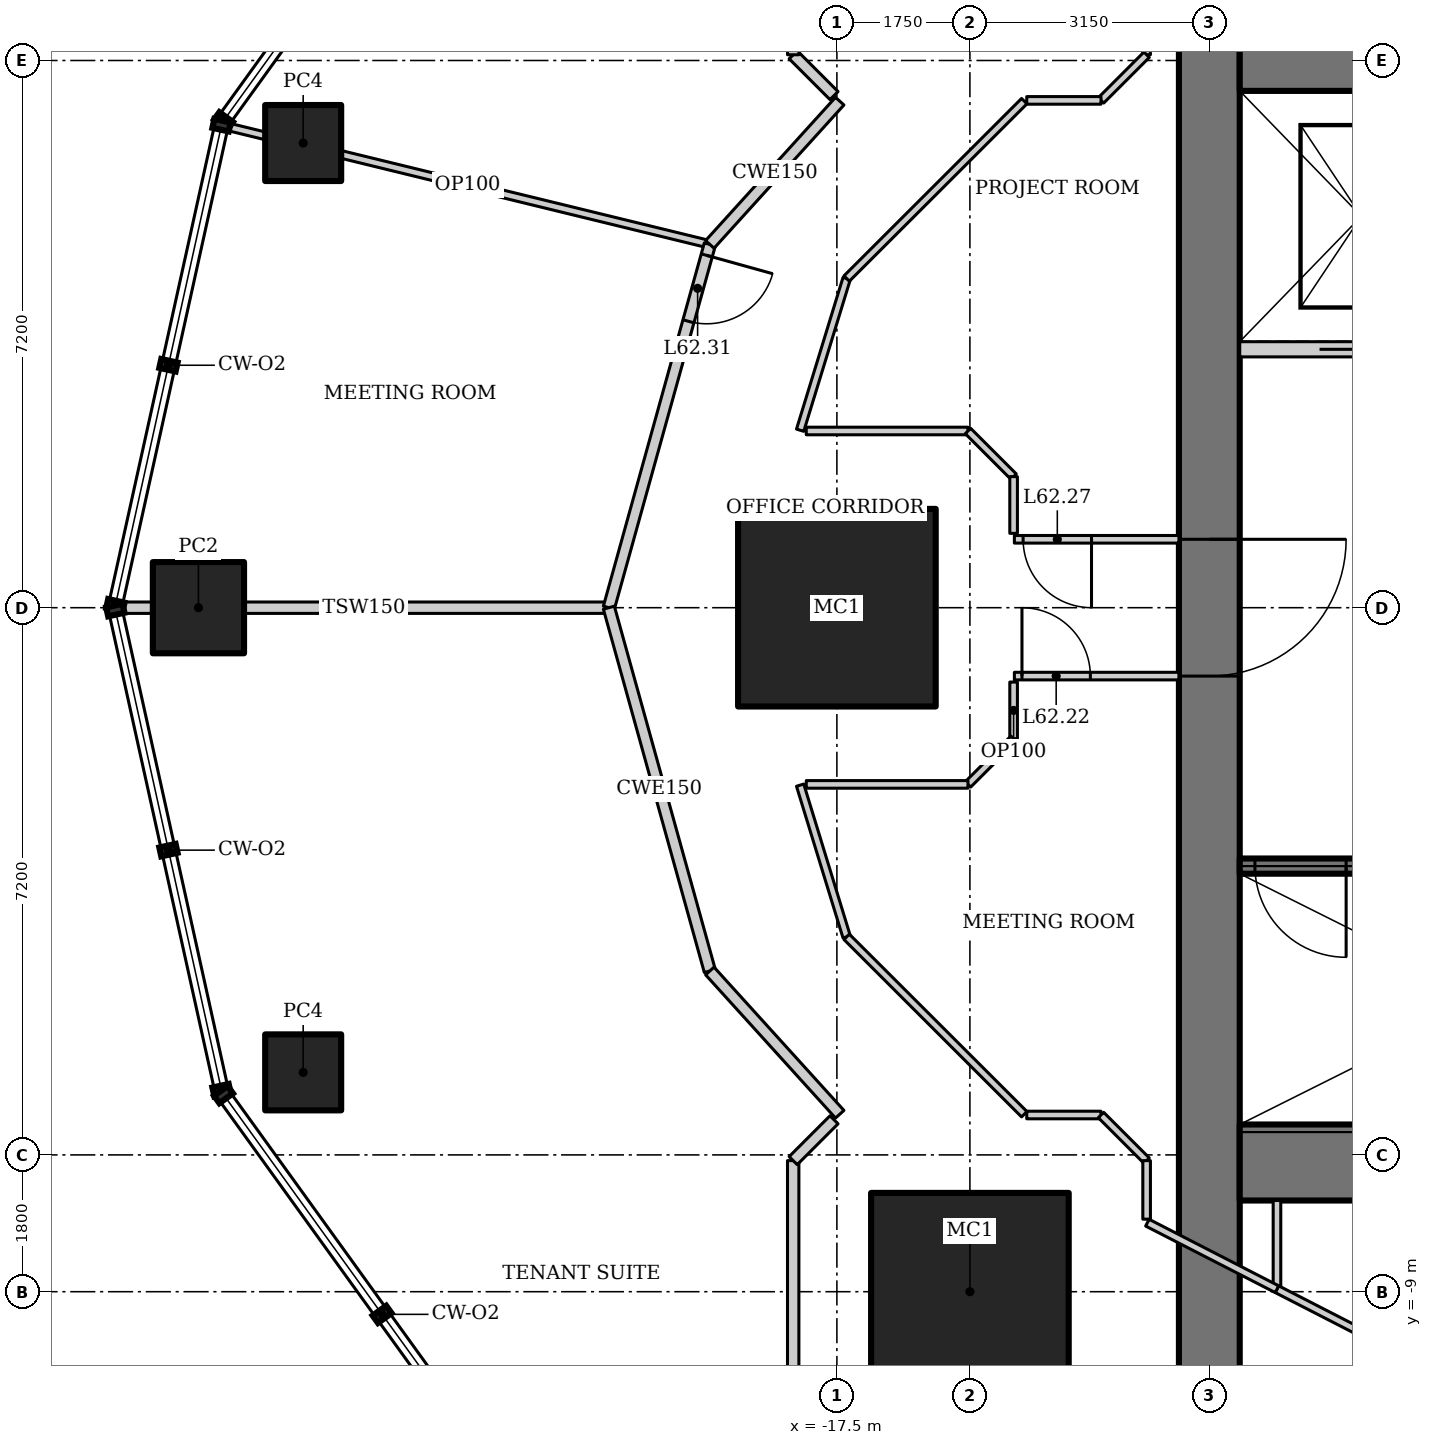
"""IFC4 building model, lengths in metres.
Left out: names, types, materials, properties, quantities, classifications, styles, units other than length and angle.
Written with IfcOpenShell. Run it as: python <this file> out.ifc"""

import sys

from ifc_helpers import new_model, si_unit, direction, frame, frame_2d, origin, origin_2d, place, context, subcontext, project, spatial, rectangle, hollow_rectangle, extrude, element, fill, save


model = new_model("IFC4")
c1 = context("Model", 3, precision=1e-05, world=origin(), true_north=direction((0.0, 1.0)))
c2 = subcontext(c1, "Body", "Model", "MODEL_VIEW")
j1 = project(units=[si_unit("LENGTHUNIT", "METRE"), si_unit("PLANEANGLEUNIT", "RADIAN")], contexts=[c1])
p1 = place(None, origin())
s1 = spatial("IfcSite", under=j1, at=p1, CompositionType="ELEMENT")
p2 = place(p1, origin())
s2 = spatial("IfcBuilding", under=s1, at=p2, CompositionType="ELEMENT")
p3 = place(p2, frame((0.0, 0.0, 266.2)))
s3 = spatial("IfcBuildingStorey", under=s2, at=p3, CompositionType="ELEMENT", Elevation=266.2)
for number, where, z_axis, x_axis in (
    (1, (-17.5, 0.0, 0.0), (0.0, 0.0, 1.0), (1.0, 0.0, 0.0)),
    (2, (-15.75, -9.0, 0.0), (0.0, 0.0, 1.0), (1.0, 0.0, 0.0)),
):
    element("IfcColumn", number, at=place(p3, frame(where, z_axis=z_axis, x_axis=x_axis)), inside=s3, PredefinedType="COLUMN", context=c2, shape_type="SweptSolid", body=[
        extrude(hollow_rectangle(XDim=2.6, YDim=2.6, WallThickness=0.13, at=origin_2d()), origin(), (0.0, 0.0, 1.0), 4.2),
    ])
p4 = place(p3, frame((-24.522, 6.114, 0.0), z_axis=(0.398362767155, -0.099325785847, 0.911834137336), x_axis=(0.241928299692, 0.970294129534, 0.0)))
e3 = element("IfcColumn", 3, at=p4, inside=s3, PredefinedType="COLUMN", context=c2, shape_type="SweptSolid", body=[
    extrude(hollow_rectangle(XDim=1.0, YDim=1.0, WallThickness=0.08, at=origin_2d()), origin(), (0.0, 0.0, 1.0), 4.378),
])
p5 = place(p3, frame((-25.9, 0.0, 0.0), z_axis=(0.429918375723, 0.0, 0.902867758986), x_axis=(0.0, 1.0, 0.0)))
e4 = element("IfcColumn", 4, at=p5, inside=s3, PredefinedType="COLUMN", context=c2, shape_type="SweptSolid", body=[
    extrude(hollow_rectangle(XDim=1.2, YDim=1.2, WallThickness=0.1, at=origin_2d()), origin(), (0.0, 0.0, 1.0), 4.363),
])
p6 = place(p3, frame((-24.522, -6.114, 0.0), z_axis=(0.398362767155, 0.099325785847, 0.911834137336), x_axis=(-0.241928299692, 0.970294129534, 0.0)))
e5 = element("IfcColumn", 5, at=p6, inside=s3, PredefinedType="COLUMN", context=c2, shape_type="SweptSolid", body=[
    extrude(hollow_rectangle(XDim=1.0, YDim=1.0, WallThickness=0.08, at=origin_2d()), origin(), (0.0, 0.0, 1.0), 4.378),
])
p7 = place(p3, frame((-12.6, 11.0, 0.0), z_axis=(0.0, 0.0, 1.0), x_axis=(0.0, -1.0, 0.0)))
e6 = element("IfcWall", 6, at=p7, inside=s3, PredefinedType="SHEAR", context=c2, shape_type="SweptSolid", body=[
    extrude(rectangle(XDim=22.0, YDim=0.8, at=frame_2d((11.0, 0.0))), origin(), (0.0, 0.0, 1.0), 4.2),
])
p8 = place(p7, frame((10.1, 0.0, 0.0)))
e7 = element("IfcOpeningElement", 7, at=p8, cuts=e6, PredefinedType="OPENING", context=c2, shape_type="SweptSolid", body=[
    extrude(rectangle(XDim=1.8, YDim=2.1, at=frame_2d((0.9, 1.05))), frame((0.0, 0.41, 0.0), z_axis=(0.0, -1.0, 0.0), x_axis=(1.0, 0.0, 0.0)), (0.0, 0.0, 1.0), 0.82),
])
p9 = place(p3, frame((-12.2, -7.3, 0.0), z_axis=(0.0, 0.0, 1.0), x_axis=(1.0, 0.0, 0.0)))
e8 = element("IfcWall", 8, at=p9, inside=s3, PredefinedType="SHEAR", context=c2, shape_type="SweptSolid", body=[
    extrude(rectangle(XDim=24.4, YDim=1.0, at=frame_2d((12.2, 0.0))), origin(), (0.0, 0.0, 1.0), 4.2),
])
p10 = place(p3, frame((-5.6, 7.3, 0.0), z_axis=(0.0, 0.0, 1.0), x_axis=(-1.0, 0.0, 0.0)))
e9 = element("IfcWall", 9, at=p10, inside=s3, PredefinedType="SHEAR", context=c2, shape_type="SweptSolid", body=[
    extrude(rectangle(XDim=6.6, YDim=1.0, at=frame_2d((3.3, 0.0))), origin(), (0.0, 0.0, 1.0), 4.2),
])
p11 = place(p3, frame((-5.6, -3.4, 0.0), z_axis=(0.0, 0.0, 1.0), x_axis=(-1.0, 0.0, 0.0)))
e10 = element("IfcWall", 10, at=p11, inside=s3, PredefinedType="SHEAR", context=c2, shape_type="SweptSolid", body=[
    extrude(rectangle(XDim=6.6, YDim=0.2, at=frame_2d((3.3, 0.0))), origin(), (0.0, 0.0, 1.0), 4.2),
])
p12 = place(p11, frame((5.2, 0.0, 0.0)))
e11 = element("IfcOpeningElement", 11, at=p12, cuts=e10, PredefinedType="OPENING", context=c2, shape_type="SweptSolid", body=[
    extrude(rectangle(XDim=1.2, YDim=2.1, at=frame_2d((0.6, 1.05))), frame((0.0, 0.11, 0.0), z_axis=(0.0, -1.0, 0.0), x_axis=(1.0, 0.0, 0.0)), (0.0, 0.0, 1.0), 0.22),
])
p13 = place(p3, frame((-12.2, 3.4, 0.0), z_axis=(0.0, 0.0, 1.0), x_axis=(1.0, 0.0, 0.0)))
e12 = element("IfcWall", 12, at=p13, inside=s3, PredefinedType="SOLIDWALL", context=c2, shape_type="SweptSolid", body=[
    extrude(rectangle(XDim=6.6, YDim=0.2, at=frame_2d((3.3, 0.0))), origin(), (0.0, 0.0, 1.0), 4.2),
])
p14 = place(p13, frame((1.05, 0.0, 0.0)))
e13 = element("IfcOpeningElement", 13, at=p14, cuts=e12, PredefinedType="OPENING", context=c2, shape_type="SweptSolid", body=[
    extrude(rectangle(XDim=1.1, YDim=2.2, at=frame_2d((0.55, 1.1))), frame((0.0, 0.11, 0.0), z_axis=(0.0, -1.0, 0.0), x_axis=(1.0, 0.0, 0.0)), (0.0, 0.0, 1.0), 0.22),
])
p15 = place(p13, frame((4.3, 0.0, 0.0)))
e14 = element("IfcOpeningElement", 14, at=p15, cuts=e12, PredefinedType="OPENING", context=c2, shape_type="SweptSolid", body=[
    extrude(rectangle(XDim=1.4, YDim=2.2, at=frame_2d((0.7, 1.1))), frame((0.0, 0.11, 0.0), z_axis=(0.0, -1.0, 0.0), x_axis=(1.0, 0.0, 0.0)), (0.0, 0.0, 1.0), 0.22),
])
p16 = place(p3, frame((-25.543, 6.335, 0.0), z_axis=(0.0, 0.0, 1.0), x_axis=(0.971467850621, -0.237171278215, 0.0)))
e15 = element("IfcWall", 15, at=p16, inside=s3, PredefinedType="PARTITIONING", context=c2, shape_type="SweptSolid", body=[
    extrude(rectangle(XDim=6.558, YDim=0.1, at=frame_2d((3.279, 0.0))), origin(), (0.0, 0.0, 1.0), 3.128),
])
p17 = place(p3, frame((-26.944, 0.0, 0.0), z_axis=(0.0, 0.0, 1.0), x_axis=(1.0, 0.0, 0.0)))
e16 = element("IfcWall", 16, at=p17, inside=s3, PredefinedType="PARTITIONING", context=c2, shape_type="SweptSolid", body=[
    extrude(rectangle(XDim=6.444, YDim=0.15, at=frame_2d((3.222, 0.0))), origin(), (0.0, 0.0, 1.0), 3.438),
])
p18 = place(p3, frame((-19.172, 4.78, 0.0), z_axis=(0.0, 0.0, 1.0), x_axis=(-0.26770731566, -0.963500281859, 0.0)))
e17 = element("IfcWall", 17, at=p18, inside=s3, PredefinedType="PARTITIONING", context=c2, shape_type="SweptSolid", body=[
    extrude(rectangle(XDim=4.961, YDim=0.15, at=frame_2d((2.48, 0.0))), origin(), (0.0, 0.0, 1.0), 4.05),
])
p19 = place(p18, frame((0.15, 0.0, 0.0)))
e18 = element("IfcOpeningElement", 18, at=p19, cuts=e17, PredefinedType="OPENING", context=c2, shape_type="SweptSolid", body=[
    extrude(rectangle(XDim=0.9, YDim=2.1, at=frame_2d((0.45, 1.05))), frame((0.0, 0.085, 0.0), z_axis=(0.0, -1.0, 0.0), x_axis=(1.0, 0.0, 0.0)), (0.0, 0.0, 1.0), 0.17),
])
p20 = place(p3, frame((-20.5, 0.0, 0.0), z_axis=(0.0, 0.0, 1.0), x_axis=(0.26770731566, -0.963500281859, 0.0)))
e19 = element("IfcWall", 19, at=p20, inside=s3, PredefinedType="PARTITIONING", context=c2, shape_type="SweptSolid", body=[
    extrude(rectangle(XDim=4.961, YDim=0.15, at=frame_2d((2.48, 0.0))), origin(), (0.0, 0.0, 1.0), 4.05),
])
p21 = place(p3, frame((-11.71, -7.8, 0.0), z_axis=(0.0, 0.0, 1.0), x_axis=(0.0, -1.0, 0.0)))
e20 = element("IfcWall", 20, at=p21, inside=s3, PredefinedType="PARTITIONING", context=c2, shape_type="SweptSolid", body=[
    extrude(rectangle(XDim=1.167, YDim=0.1, at=frame_2d((0.583, 0.0))), origin(), (0.0, 0.0, 1.0), 4.05),
])
p22 = place(p3, frame((-9.67, -10.014, 0.0), z_axis=(0.0, 0.0, 1.0), x_axis=(-0.889605609385, 0.456729525814, 0.0)))
e21 = element("IfcWall", 21, at=p22, inside=s3, PredefinedType="PARTITIONING", context=c2, shape_type="SweptSolid", body=[
    extrude(rectangle(XDim=2.293, YDim=0.1, at=frame_2d((1.146, 0.0))), origin(), (0.0, 0.0, 1.0), 4.05),
])
p23 = place(p3, frame((-17.372, -4.331, 0.0), z_axis=(0.0, 0.0, 1.0), x_axis=(-0.293231279211, 0.956041535129, 0.0)))
e22 = element("IfcWall", 22, at=p23, inside=s3, PredefinedType="PARTITIONING", context=c2, shape_type="SweptSolid", body=[
    extrude(rectangle(XDim=2.088, YDim=0.1, at=frame_2d((1.044, 0.0))), origin(), (0.0, 0.0, 1.0), 4.05),
])
p24 = place(p3, frame((-15.165, -0.9, 0.0), z_axis=(0.0, 0.0, 1.0), x_axis=(1.0, 0.0, 0.0)))
e23 = element("IfcWall", 23, at=p24, inside=s3, PredefinedType="PARTITIONING", context=c2, shape_type="SweptSolid", body=[
    extrude(rectangle(XDim=2.165, YDim=0.1, at=frame_2d((1.083, 0.0))), origin(), (0.0, 0.0, 1.0), 4.05),
])
p25 = place(p24, frame((0.1, 0.0, 0.0)))
e24 = element("IfcOpeningElement", 24, at=p25, cuts=e23, PredefinedType="OPENING", context=c2, shape_type="SweptSolid", body=[
    extrude(rectangle(XDim=0.9, YDim=2.1, at=frame_2d((0.45, 1.05))), frame((0.0, 0.06, 0.0), z_axis=(0.0, -1.0, 0.0), x_axis=(1.0, 0.0, 0.0)), (0.0, 0.0, 1.0), 0.12),
])
p26 = place(p3, frame((-13.0, 0.9, 0.0), z_axis=(0.0, 0.0, 1.0), x_axis=(-1.0, 0.0, 0.0)))
e25 = element("IfcWall", 25, at=p26, inside=s3, PredefinedType="PARTITIONING", context=c2, shape_type="SweptSolid", body=[
    extrude(rectangle(XDim=2.165, YDim=0.1, at=frame_2d((1.083, 0.0))), origin(), (0.0, 0.0, 1.0), 4.05),
])
p27 = place(p26, frame((1.15, 0.0, 0.0)))
e26 = element("IfcOpeningElement", 26, at=p27, cuts=e25, PredefinedType="OPENING", context=c2, shape_type="SweptSolid", body=[
    extrude(rectangle(XDim=0.9, YDim=2.1, at=frame_2d((0.45, 1.05))), frame((0.0, 0.06, 0.0), z_axis=(0.0, -1.0, 0.0), x_axis=(1.0, 0.0, 0.0)), (0.0, 0.0, 1.0), 0.12),
])
p28 = place(p3, frame((-17.984, 2.335, 0.0), z_axis=(0.0, 0.0, 1.0), x_axis=(0.293231279211, 0.956041535129, 0.0)))
e27 = element("IfcWall", 27, at=p28, inside=s3, PredefinedType="PARTITIONING", context=c2, shape_type="SweptSolid", body=[
    extrude(rectangle(XDim=2.088, YDim=0.1, at=frame_2d((1.044, 0.0))), origin(), (0.0, 0.0, 1.0), 4.05),
])
p29 = place(p3, frame((-15.175, -0.978, 0.0), z_axis=(0.0, 0.0, 1.0), x_axis=(0.0, -1.0, 0.0)))
e28 = element("IfcWall", 28, at=p29, inside=s3, PredefinedType="PARTITIONING", context=c2, shape_type="SweptSolid", body=[
    extrude(rectangle(XDim=0.746, YDim=0.1, at=frame_2d((0.373, 0.0))), origin(), (0.0, 0.0, 1.0), 4.05),
])
p30 = place(p3, frame((-15.175, -1.725, 0.0), z_axis=(0.0, 0.0, 1.0), x_axis=(-0.707106781187, -0.707106781187, 0.0)))
e29 = element("IfcWall", 29, at=p30, inside=s3, PredefinedType="PARTITIONING", context=c2, shape_type="SweptSolid", body=[
    extrude(rectangle(XDim=0.849, YDim=0.1, at=frame_2d((0.425, 0.0))), origin(), (0.0, 0.0, 1.0), 4.05),
])
for number, where, z_axis, x_axis in (
    (30, (-15.775, -2.325, 0.0), (0.0, 0.0, 1.0), (-1.0, 0.0, 0.0)),
    (31, (-17.903, 2.325, 0.0), (0.0, 0.0, 1.0), (1.0, 0.0, 0.0)),
):
    element("IfcWall", number, at=place(p3, frame(where, z_axis=z_axis, x_axis=x_axis)), inside=s3, PredefinedType="PARTITIONING", context=c2, shape_type="SweptSolid", body=[
        extrude(rectangle(XDim=2.128, YDim=0.1, at=frame_2d((1.064, 0.0))), origin(), (0.0, 0.0, 1.0), 4.05),
    ])
p31 = place(p3, frame((-15.775, 2.325, 0.0), z_axis=(0.0, 0.0, 1.0), x_axis=(0.707106781187, -0.707106781187, 0.0)))
e32 = element("IfcWall", 32, at=p31, inside=s3, PredefinedType="PARTITIONING", context=c2, shape_type="SweptSolid", body=[
    extrude(rectangle(XDim=0.849, YDim=0.1, at=frame_2d((0.425, 0.0))), origin(), (0.0, 0.0, 1.0), 4.05),
])
p32 = place(p3, frame((-15.175, 1.725, 0.0), z_axis=(0.0, 0.0, 1.0), x_axis=(0.0, -1.0, 0.0)))
e33 = element("IfcWall", 33, at=p32, inside=s3, PredefinedType="PARTITIONING", context=c2, shape_type="SweptSolid", body=[
    extrude(rectangle(XDim=0.746, YDim=0.1, at=frame_2d((0.373, 0.0))), origin(), (0.0, 0.0, 1.0), 4.05),
])
p33 = place(p3, frame((-19.172, -4.78, 0.0), z_axis=(0.0, 0.0, 1.0), x_axis=(0.671721890643, -0.74080341632, 0.0)))
e34 = element("IfcWall", 34, at=p33, inside=s3, PredefinedType="PARTITIONING", context=c2, shape_type="SweptSolid", body=[
    extrude(rectangle(XDim=2.544, YDim=0.15, at=frame_2d((1.272, 0.0))), origin(), (0.0, 0.0, 1.0), 4.05),
])
p34 = place(p3, frame((-11.71, -8.967, 0.0), z_axis=(0.0, 0.0, 1.0), x_axis=(-0.889638356137, 0.456665736935, 0.0)))
e35 = element("IfcWall", 35, at=p34, inside=s3, PredefinedType="PARTITIONING", context=c2, shape_type="SweptSolid", body=[
    extrude(rectangle(XDim=1.917, YDim=0.1, at=frame_2d((0.958, 0.0))), origin(), (0.0, 0.0, 1.0), 4.05),
])
p35 = place(p3, frame((-15.035, -6.665, 0.0), z_axis=(0.0, 0.0, 1.0), x_axis=(-0.707587114823, 0.70662612104, 0.0)))
e36 = element("IfcWall", 36, at=p35, inside=s3, PredefinedType="PARTITIONING", context=c2, shape_type="SweptSolid", body=[
    extrude(rectangle(XDim=3.303, YDim=0.1, at=frame_2d((1.651, 0.0))), origin(), (0.0, 0.0, 1.0), 4.05),
])
p36 = place(p3, frame((-15.002, -6.675, 0.0), z_axis=(0.0, 0.0, 1.0), x_axis=(1.0, 0.0, 0.0)))
e37 = element("IfcWall", 37, at=p36, inside=s3, PredefinedType="PARTITIONING", context=c2, shape_type="SweptSolid", body=[
    extrude(rectangle(XDim=0.977, YDim=0.1, at=frame_2d((0.488, 0.0))), origin(), (0.0, 0.0, 1.0), 4.05),
])
p37 = place(p3, frame((-14.025, -6.675, 0.0), z_axis=(0.0, 0.0, 1.0), x_axis=(0.707106781187, -0.707106781187, 0.0)))
e38 = element("IfcWall", 38, at=p37, inside=s3, PredefinedType="PARTITIONING", context=c2, shape_type="SweptSolid", body=[
    extrude(rectangle(XDim=0.849, YDim=0.1, at=frame_2d((0.425, 0.0))), origin(), (0.0, 0.0, 1.0), 4.05),
])
p38 = place(p3, frame((-13.425, -7.275, 0.0), z_axis=(0.0, 0.0, 1.0), x_axis=(0.0, -1.0, 0.0)))
e39 = element("IfcWall", 39, at=p38, inside=s3, PredefinedType="PARTITIONING", context=c2, shape_type="SweptSolid", body=[
    extrude(rectangle(XDim=0.77, YDim=0.1, at=frame_2d((0.385, 0.0))), origin(), (0.0, 0.0, 1.0), 4.05),
])
p39 = place(p3, frame((-18.075, -10.725, 0.0), z_axis=(0.0, 0.0, 1.0), x_axis=(0.0, 1.0, 0.0)))
e40 = element("IfcWall", 40, at=p39, inside=s3, PredefinedType="PARTITIONING", context=c2, shape_type="SweptSolid", body=[
    extrude(rectangle(XDim=3.449, YDim=0.15, at=frame_2d((1.725, 0.0))), origin(), (0.0, 0.0, 1.0), 3.522),
])
p40 = place(p3, frame((-18.075, -7.275, 0.0), z_axis=(0.0, 0.0, 1.0), x_axis=(0.707106781187, 0.707106781187, 0.0)))
e41 = element("IfcWall", 41, at=p40, inside=s3, PredefinedType="PARTITIONING", context=c2, shape_type="SweptSolid", body=[
    extrude(rectangle(XDim=0.76, YDim=0.15, at=frame_2d((0.38, 0.0))), origin(), (0.0, 0.0, 1.0), 4.05),
])
p41 = place(p3, frame((-17.463, 6.665, 0.0), z_axis=(0.0, 0.0, 1.0), x_axis=(-0.671721890643, -0.74080341632, 0.0)))
e42 = element("IfcWall", 42, at=p41, inside=s3, PredefinedType="PARTITIONING", context=c2, shape_type="SweptSolid", body=[
    extrude(rectangle(XDim=2.544, YDim=0.15, at=frame_2d((1.272, 0.0))), origin(), (0.0, 0.0, 1.0), 4.05),
])
p42 = place(p3, frame((-17.372, 4.331, 0.0), z_axis=(0.0, 0.0, 1.0), x_axis=(0.707587114823, 0.70662612104, 0.0)))
e43 = element("IfcWall", 43, at=p42, inside=s3, PredefinedType="PARTITIONING", context=c2, shape_type="SweptSolid", body=[
    extrude(rectangle(XDim=3.303, YDim=0.1, at=frame_2d((1.651, 0.0))), origin(), (0.0, 0.0, 1.0), 4.05),
])
p43 = place(p3, frame((-13.425, 8.046, 0.0), z_axis=(0.0, 0.0, 1.0), x_axis=(0.0, -1.0, 0.0)))
e44 = element("IfcWall", 44, at=p43, inside=s3, PredefinedType="PARTITIONING", context=c2, shape_type="SweptSolid", body=[
    extrude(rectangle(XDim=0.77, YDim=0.1, at=frame_2d((0.385, 0.0))), origin(), (0.0, 0.0, 1.0), 4.05),
])
p44 = place(p3, frame((-13.425, 7.275, 0.0), z_axis=(0.0, 0.0, 1.0), x_axis=(-0.707106781187, -0.707106781187, 0.0)))
e45 = element("IfcWall", 45, at=p44, inside=s3, PredefinedType="PARTITIONING", context=c2, shape_type="SweptSolid", body=[
    extrude(rectangle(XDim=0.849, YDim=0.1, at=frame_2d((0.425, 0.0))), origin(), (0.0, 0.0, 1.0), 4.05),
])
p45 = place(p3, frame((-14.025, 6.675, 0.0), z_axis=(0.0, 0.0, 1.0), x_axis=(-1.0, 0.0, 0.0)))
e46 = element("IfcWall", 46, at=p45, inside=s3, PredefinedType="PARTITIONING", context=c2, shape_type="SweptSolid", body=[
    extrude(rectangle(XDim=0.977, YDim=0.1, at=frame_2d((0.488, 0.0))), origin(), (0.0, 0.0, 1.0), 4.05),
])
p46 = place(p3, frame((-17.538, 6.738, 0.0), z_axis=(0.0, 0.0, 1.0), x_axis=(-0.707106781187, 0.707106781187, 0.0)))
e47 = element("IfcWall", 47, at=p46, inside=s3, PredefinedType="PARTITIONING", context=c2, shape_type="SweptSolid", body=[
    extrude(rectangle(XDim=0.76, YDim=0.15, at=frame_2d((0.38, 0.0))), origin(), (0.0, 0.0, 1.0), 4.05),
])
p47 = place(p3, frame((-18.075, 7.275, 0.0), z_axis=(0.0, 0.0, 1.0), x_axis=(0.0, 1.0, 0.0)))
e48 = element("IfcWall", 48, at=p47, inside=s3, PredefinedType="PARTITIONING", context=c2, shape_type="SweptSolid", body=[
    extrude(rectangle(XDim=3.449, YDim=0.15, at=frame_2d((1.725, 0.0))), origin(), (0.0, 0.0, 1.0), 3.522),
])
p48 = place(p12, origin())
e49 = element("IfcDoor", 49, at=p48, inside=s3, OperationType="SINGLE_SWING_RIGHT", PredefinedType="DOOR", context=c2, shape_type="SweptSolid", body=[
    extrude(rectangle(XDim=1.2, YDim=2.1, at=frame_2d((0.6, 1.05))), frame((0.0, 0.025, 0.0), z_axis=(0.0, -1.0, 0.0), x_axis=(1.0, 0.0, 0.0)), (0.0, 0.0, 1.0), 0.05),
])
fill(e11, e49)
p49 = place(p8, origin())
e50 = element("IfcDoor", 50, at=p49, inside=s3, OperationType="DOUBLE_DOOR_DOUBLE_SWING", PredefinedType="DOOR", context=c2, shape_type="SweptSolid", body=[
    extrude(rectangle(XDim=1.8, YDim=2.1, at=frame_2d((0.9, 1.05))), frame((0.0, 0.025, 0.0), z_axis=(0.0, -1.0, 0.0), x_axis=(1.0, 0.0, 0.0)), (0.0, 0.0, 1.0), 0.05),
])
fill(e7, e50)
p50 = place(p14, origin())
e51 = element("IfcDoor", 51, at=p50, inside=s3, OperationType="DOUBLE_DOOR_SLIDING", PredefinedType="DOOR", context=c2, shape_type="SweptSolid", body=[
    extrude(rectangle(XDim=1.1, YDim=2.2, at=frame_2d((0.55, 1.1))), frame((0.0, 0.025, 0.0), z_axis=(0.0, -1.0, 0.0), x_axis=(1.0, 0.0, 0.0)), (0.0, 0.0, 1.0), 0.05),
])
fill(e13, e51)
p51 = place(p25, origin())
e52 = element("IfcDoor", 52, at=p51, inside=s3, OperationType="SINGLE_SWING_LEFT", PredefinedType="DOOR", context=c2, shape_type="SweptSolid", body=[
    extrude(rectangle(XDim=0.9, YDim=2.1, at=frame_2d((0.45, 1.05))), frame((0.0, 0.025, 0.0), z_axis=(0.0, -1.0, 0.0), x_axis=(1.0, 0.0, 0.0)), (0.0, 0.0, 1.0), 0.05),
])
fill(e24, e52)
p52 = place(p27, origin())
e53 = element("IfcDoor", 53, at=p52, inside=s3, OperationType="SINGLE_SWING_LEFT", PredefinedType="DOOR", context=c2, shape_type="SweptSolid", body=[
    extrude(rectangle(XDim=0.9, YDim=2.1, at=frame_2d((0.45, 1.05))), frame((0.0, 0.025, 0.0), z_axis=(0.0, -1.0, 0.0), x_axis=(1.0, 0.0, 0.0)), (0.0, 0.0, 1.0), 0.05),
])
fill(e26, e53)
p53 = place(p19, origin())
e54 = element("IfcDoor", 54, at=p53, inside=s3, OperationType="SINGLE_SWING_LEFT", PredefinedType="DOOR", context=c2, shape_type="SweptSolid", body=[
    extrude(rectangle(XDim=0.9, YDim=2.1, at=frame_2d((0.45, 1.05))), frame((0.0, 0.025, 0.0), z_axis=(0.0, -1.0, 0.0), x_axis=(1.0, 0.0, 0.0)), (0.0, 0.0, 1.0), 0.05),
])
fill(e18, e54)
save(model, sys.argv[1])
